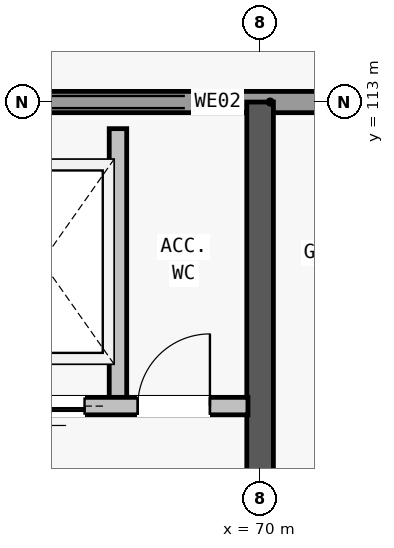
"""IFC4 building model, lengths in metres.
Left out: names, types, materials, properties, quantities, classifications, styles, units other than length and angle.
Written with IfcOpenShell. Run it as: python <this file> out.ifc"""

import sys

from ifc_helpers import new_model, si_unit, direction, frame, frame_2d, origin, place, context, subcontext, project, spatial, rectangle, extrude, element, fill, save


model = new_model("IFC4")
c1 = context("Model", 3, precision=1e-05, world=origin(), true_north=direction((0.0, 1.0)))
c2 = subcontext(c1, "Body", "Model", "MODEL_VIEW")
j1 = project(units=[si_unit("LENGTHUNIT", "METRE"), si_unit("PLANEANGLEUNIT", "RADIAN")], contexts=[c1])
p1 = place(None, origin())
s1 = spatial("IfcSite", under=j1, at=p1, CompositionType="ELEMENT")
p2 = place(p1, origin())
s2 = spatial("IfcBuilding", under=s1, at=p2, CompositionType="ELEMENT")
p3 = place(p2, frame((0.0, 0.0, 25.1)))
s3 = spatial("IfcBuildingStorey", under=s2, at=p3, CompositionType="ELEMENT", Elevation=25.1)
p4 = place(p3, frame((62.45, 113.0, 0.0), z_axis=(0.0, 0.0, 1.0), x_axis=(1.0, 0.0, 0.0)))
e1 = element("IfcWall", 1, at=p4, inside=s3, PredefinedType="STANDARD", context=c2, shape_type="SweptSolid", body=[
    extrude(rectangle(XDim=15.365, YDim=0.28, at=frame_2d((7.683, 0.0))), origin(), (0.0, 0.0, 1.0), 2.65),
])
p5 = place(p4, frame((9.23, 0.0, 0.0)))
e2 = element("IfcOpeningElement", 2, at=p5, cuts=e1, PredefinedType="OPENING", context=c2, shape_type="SweptSolid", body=[
    extrude(rectangle(XDim=1.7, YDim=2.2, at=frame_2d((0.85, 1.1))), frame((0.0, 0.15, 0.0), z_axis=(0.0, -1.0, 0.0), x_axis=(1.0, 0.0, 0.0)), (0.0, 0.0, 1.0), 0.3),
])
p6 = place(p3, frame((70.0, 104.0, 0.0), z_axis=(0.0, 0.0, 1.0), x_axis=(0.0, 1.0, 0.0)))
e3 = element("IfcWall", 3, at=p6, inside=s3, PredefinedType="SHEAR", context=c2, shape_type="SweptSolid", body=[
    extrude(rectangle(XDim=9.0, YDim=0.35, at=frame_2d((4.5, 0.0))), origin(), (0.0, 0.0, 1.0), 2.38),
])
p7 = place(p6, frame((1.4, 0.0, 0.0)))
e4 = element("IfcOpeningElement", 4, at=p7, cuts=e3, PredefinedType="OPENING", context=c2, shape_type="SweptSolid", body=[
    extrude(rectangle(XDim=1.9, YDim=2.3, at=frame_2d((0.95, 1.15))), frame((0.0, 0.185, 0.0), z_axis=(0.0, -1.0, 0.0), x_axis=(1.0, 0.0, 0.0)), (0.0, 0.0, 1.0), 0.37),
])
p8 = place(p3, frame((68.13, 109.0, 0.0), z_axis=(0.0, 0.0, 1.0), x_axis=(0.0, 1.0, 0.0)))
e5 = element("IfcWall", 5, at=p8, inside=s3, PredefinedType="PARTITIONING", context=c2, shape_type="SweptSolid", body=[
    extrude(rectangle(XDim=3.65, YDim=0.23, at=frame_2d((1.825, 0.0))), origin(), (0.0, 0.0, 1.0), 2.38),
])
p9 = place(p3, frame((66.21, 109.0, 0.0), z_axis=(0.0, 0.0, 1.0), x_axis=(1.0, 0.0, 0.0)))
e6 = element("IfcWall", 6, at=p9, inside=s3, PredefinedType="PARTITIONING", context=c2, shape_type="SweptSolid", body=[
    extrude(rectangle(XDim=3.63, YDim=0.23, at=frame_2d((1.815, 0.0))), origin(), (0.0, 0.0, 1.0), 2.38),
])
p10 = place(p9, frame((0.38, 0.0, 0.0)))
e7 = element("IfcOpeningElement", 7, at=p10, cuts=e6, PredefinedType="OPENING", context=c2, shape_type="SweptSolid", body=[
    extrude(rectangle(XDim=1.1, YDim=2.15, at=frame_2d((0.55, 1.075))), frame((0.0, 0.125, 0.0), z_axis=(0.0, -1.0, 0.0), x_axis=(1.0, 0.0, 0.0)), (0.0, 0.0, 1.0), 0.25),
])
p11 = place(p9, frame((2.18, 0.0, 0.0)))
e8 = element("IfcOpeningElement", 8, at=p11, cuts=e6, PredefinedType="OPENING", context=c2, shape_type="SweptSolid", body=[
    extrude(rectangle(XDim=0.95, YDim=2.1, at=frame_2d((0.475, 1.05))), frame((0.0, 0.125, 0.0), z_axis=(0.0, -1.0, 0.0), x_axis=(1.0, 0.0, 0.0)), (0.0, 0.0, 1.0), 0.25),
])
p12 = place(p10, origin())
e9 = element("IfcDoor", 9, at=p12, inside=s3, OperationType="SLIDING_TO_LEFT", PredefinedType="DOOR", context=c2, shape_type="SweptSolid", body=[
    extrude(rectangle(XDim=1.1, YDim=2.15, at=frame_2d((0.55, 1.075))), frame((0.0, 0.025, 0.0), z_axis=(0.0, -1.0, 0.0), x_axis=(1.0, 0.0, 0.0)), (0.0, 0.0, 1.0), 0.05),
])
fill(e7, e9)
p13 = place(p11, origin())
e10 = element("IfcDoor", 10, at=p13, inside=s3, OperationType="SINGLE_SWING_RIGHT", PredefinedType="DOOR", context=c2, shape_type="SweptSolid", body=[
    extrude(rectangle(XDim=0.95, YDim=2.1, at=frame_2d((0.475, 1.05))), frame((0.0, 0.025, 0.0), z_axis=(0.0, -1.0, 0.0), x_axis=(1.0, 0.0, 0.0)), (0.0, 0.0, 1.0), 0.05),
])
fill(e8, e10)
save(model, sys.argv[1])
